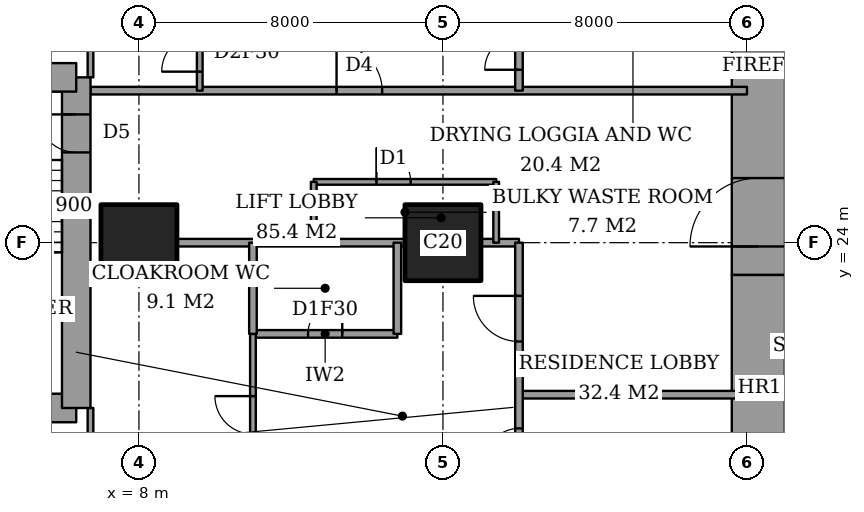
"""IFC4 building model, lengths in metres.
Left out: names, types, materials, properties, quantities, classifications, styles, units other than length and angle.
Written with IfcOpenShell. Run it as: python <this file> out.ifc"""

import sys

from ifc_helpers import new_model, si_unit, direction, frame, frame_2d, origin, origin_2d, place, context, subcontext, project, spatial, rectangle, extrude, element, fill, save


model = new_model("IFC4")
c1 = context("Model", 3, precision=1e-05, world=origin(), true_north=direction((0.0, 1.0)))
c2 = subcontext(c1, "Body", "Model", "MODEL_VIEW")
j1 = project(units=[si_unit("LENGTHUNIT", "METRE"), si_unit("PLANEANGLEUNIT", "RADIAN")], contexts=[c1])
p1 = place(None, origin())
s1 = spatial("IfcSite", under=j1, at=p1, CompositionType="ELEMENT")
p2 = place(p1, origin())
s2 = spatial("IfcBuilding", under=s1, at=p2, CompositionType="ELEMENT")
p3 = place(p2, frame((0.0, 0.0, 69.2)))
s3 = spatial("IfcBuildingStorey", under=s2, at=p3, CompositionType="ELEMENT", Elevation=69.2)
for number, where, z_axis, x_axis in (
    (1, (8.0, 24.0, 0.0), (0.0, 0.0, 1.0), (1.0, 0.0, 0.0)),
    (2, (16.0, 24.0, 0.0), (0.0, 0.0, 1.0), (1.0, 0.0, 0.0)),
):
    element("IfcColumn", number, at=place(p3, frame(where, z_axis=z_axis, x_axis=x_axis)), inside=s3, PredefinedType="COLUMN", context=c2, shape_type="SweptSolid", body=[
        extrude(rectangle(XDim=2.0, YDim=2.0, at=origin_2d()), origin(), (0.0, 0.0, 1.0), 3.6),
    ])
p4 = place(p3, frame((24.3, 13.0, 0.0), z_axis=(0.0, 0.0, 1.0), x_axis=(0.0, 1.0, 0.0)))
e3 = element("IfcWall", 3, at=p4, inside=s3, PredefinedType="SHEAR", context=c2, shape_type="SweptSolid", body=[
    extrude(rectangle(XDim=10.15, YDim=1.4, at=frame_2d((5.075, 0.0))), origin(), (0.0, 0.0, 1.0), 3.6),
])
p5 = place(p3, frame((24.3, 23.15, 0.0), z_axis=(0.0, 0.0, 1.0), x_axis=(0.0, 1.0, 0.0)))
e4 = element("IfcWall", 4, at=p5, inside=s3, PredefinedType="SHEAR", context=c2, shape_type="SweptSolid", body=[
    extrude(rectangle(XDim=11.85, YDim=1.4, at=frame_2d((5.925, 0.0))), origin(), (0.0, 0.0, 1.0), 3.6),
])
p6 = place(p5, frame((0.75, 0.0, 0.0)))
e5 = element("IfcOpeningElement", 5, at=p6, cuts=e4, PredefinedType="OPENING", context=c2, shape_type="SweptSolid", body=[
    extrude(rectangle(XDim=1.8, YDim=2.4, at=frame_2d((0.9, 1.2))), frame((0.0, 0.71, 0.0), z_axis=(0.0, -1.0, 0.0), x_axis=(1.0, 0.0, 0.0)), (0.0, 0.0, 1.0), 1.42),
])
p7 = place(p3, frame((1.9, 19.65, 0.0), z_axis=(0.0, 0.0, 1.0), x_axis=(1.0, 0.0, 0.0)))
e6 = element("IfcWall", 6, at=p7, inside=s3, PredefinedType="SHEAR", context=c2, shape_type="SweptSolid", body=[
    extrude(rectangle(XDim=4.45, YDim=0.75, at=frame_2d((2.225, 0.0))), origin(), (0.0, 0.0, 1.0), 3.6),
])
p8 = place(p3, frame((6.35, 19.65, 0.0), z_axis=(0.0, 0.0, 1.0), x_axis=(0.0, 1.0, 0.0)))
e7 = element("IfcWall", 7, at=p8, inside=s3, PredefinedType="SHEAR", context=c2, shape_type="SweptSolid", body=[
    extrude(rectangle(XDim=8.7, YDim=0.75, at=frame_2d((4.35, 0.0))), origin(), (0.0, 0.0, 1.0), 3.6),
])
p9 = place(p8, frame((6.725, 0.0, 0.0)))
e8 = element("IfcOpeningElement", 8, at=p9, cuts=e7, PredefinedType="OPENING", context=c2, shape_type="SweptSolid", body=[
    extrude(rectangle(XDim=1.0, YDim=2.1, at=frame_2d((0.5, 1.05))), frame((0.0, 0.385, 0.0), z_axis=(0.0, -1.0, 0.0), x_axis=(1.0, 0.0, 0.0)), (0.0, 0.0, 1.0), 0.77),
])
p10 = place(p3, frame((6.35, 28.35, 0.0), z_axis=(0.0, 0.0, 1.0), x_axis=(-1.0, 0.0, 0.0)))
e9 = element("IfcWall", 9, at=p10, inside=s3, PredefinedType="SHEAR", context=c2, shape_type="SweptSolid", body=[
    extrude(rectangle(XDim=4.45, YDim=0.75, at=frame_2d((2.225, 0.0))), origin(), (0.0, 0.0, 1.0), 3.6),
])
p11 = place(p3, frame((18.0, 20.0, 0.0), z_axis=(0.0, 0.0, 1.0), x_axis=(1.0, 0.0, 0.0)))
e10 = element("IfcWall", 10, at=p11, inside=s3, PredefinedType="PARTITIONING", context=c2, shape_type="SweptSolid", body=[
    extrude(rectangle(XDim=6.0, YDim=0.2, at=frame_2d((3.0, 0.0))), origin(), (0.0, 0.0, 1.0), 3.35),
])
p12 = place(p3, frame((11.0, 21.6, 0.0), z_axis=(0.0, 0.0, 1.0), x_axis=(1.0, 0.0, 0.0)))
e11 = element("IfcWall", 11, at=p12, inside=s3, PredefinedType="PARTITIONING", context=c2, shape_type="SweptSolid", body=[
    extrude(rectangle(XDim=3.8, YDim=0.2, at=frame_2d((1.9, 0.0))), origin(), (0.0, 0.0, 1.0), 3.35),
])
p13 = place(p12, frame((1.45, 0.0, 0.0)))
e12 = element("IfcOpeningElement", 12, at=p13, cuts=e11, PredefinedType="OPENING", context=c2, shape_type="SweptSolid", body=[
    extrude(rectangle(XDim=0.9, YDim=2.1, at=frame_2d((0.45, 1.05))), frame((0.0, 0.11, 0.0), z_axis=(0.0, -1.0, 0.0), x_axis=(1.0, 0.0, 0.0)), (0.0, 0.0, 1.0), 0.22),
])
p14 = place(p3, frame((9.0, 24.0, 0.0), z_axis=(0.0, 0.0, 1.0), x_axis=(1.0, 0.0, 0.0)))
e13 = element("IfcWall", 13, at=p14, inside=s3, PredefinedType="PARTITIONING", context=c2, shape_type="SweptSolid", body=[
    extrude(rectangle(XDim=6.0, YDim=0.2, at=frame_2d((3.0, 0.0))), origin(), (0.0, 0.0, 1.0), 3.35),
])
p15 = place(p3, frame((17.0, 24.0, 0.0), z_axis=(0.0, 0.0, 1.0), x_axis=(1.0, 0.0, 0.0)))
e14 = element("IfcWall", 14, at=p15, inside=s3, PredefinedType="PARTITIONING", context=c2, shape_type="SweptSolid", body=[
    extrude(rectangle(XDim=1.0, YDim=0.2, at=frame_2d((0.5, 0.0))), origin(), (0.0, 0.0, 1.0), 3.35),
])
p16 = place(p3, frame((12.6, 25.6, 0.0), z_axis=(0.0, 0.0, 1.0), x_axis=(1.0, 0.0, 0.0)))
e15 = element("IfcWall", 15, at=p16, inside=s3, PredefinedType="PARTITIONING", context=c2, shape_type="SweptSolid", body=[
    extrude(rectangle(XDim=4.8, YDim=0.15, at=frame_2d((2.4, 0.0))), origin(), (0.0, 0.0, 1.0), 3.35),
])
p17 = place(p16, frame((1.65, 0.0, 0.0)))
e16 = element("IfcOpeningElement", 16, at=p17, cuts=e15, PredefinedType="OPENING", context=c2, shape_type="SweptSolid", body=[
    extrude(rectangle(XDim=0.9, YDim=2.1, at=frame_2d((0.45, 1.05))), frame((0.0, 0.085, 0.0), z_axis=(0.0, -1.0, 0.0), x_axis=(1.0, 0.0, 0.0)), (0.0, 0.0, 1.0), 0.17),
])
p18 = place(p3, frame((6.725, 28.0, 0.0), z_axis=(0.0, 0.0, 1.0), x_axis=(1.0, 0.0, 0.0)))
e17 = element("IfcWall", 17, at=p18, inside=s3, PredefinedType="PARTITIONING", context=c2, shape_type="SweptSolid", body=[
    extrude(rectangle(XDim=17.275, YDim=0.2, at=frame_2d((8.637, 0.0))), origin(), (0.0, 0.0, 1.0), 3.35),
])
p19 = place(p18, frame((6.475, 0.0, 0.0)))
e18 = element("IfcOpeningElement", 18, at=p19, cuts=e17, PredefinedType="OPENING", context=c2, shape_type="SweptSolid", body=[
    extrude(rectangle(XDim=1.2, YDim=2.4, at=frame_2d((0.6, 1.2))), frame((0.0, 0.11, 0.0), z_axis=(0.0, -1.0, 0.0), x_axis=(1.0, 0.0, 0.0)), (0.0, 0.0, 1.0), 0.22),
])
p20 = place(p3, frame((6.725, 17.2, 0.0), z_axis=(0.0, 0.0, 1.0), x_axis=(0.0, 1.0, 0.0)))
e19 = element("IfcWall", 19, at=p20, inside=s3, PredefinedType="PARTITIONING", context=c2, shape_type="SweptSolid", body=[
    extrude(rectangle(XDim=2.45, YDim=0.15, at=frame_2d((1.225, 0.0))), origin(), (0.0, 0.0, 1.0), 3.35),
])
p21 = place(p20, frame((0.587, 0.0, 0.0)))
e20 = element("IfcOpeningElement", 20, at=p21, cuts=e19, PredefinedType="OPENING", context=c2, shape_type="SweptSolid", body=[
    extrude(rectangle(XDim=0.9, YDim=2.1, at=frame_2d((0.45, 1.05))), frame((0.0, 0.085, 0.0), z_axis=(0.0, -1.0, 0.0), x_axis=(1.0, 0.0, 0.0)), (0.0, 0.0, 1.0), 0.17),
])
p22 = place(p3, frame((6.725, 28.35, 0.0), z_axis=(0.0, 0.0, 1.0), x_axis=(0.0, 1.0, 0.0)))
e21 = element("IfcWall", 21, at=p22, inside=s3, PredefinedType="PARTITIONING", context=c2, shape_type="SweptSolid", body=[
    extrude(rectangle(XDim=2.45, YDim=0.15, at=frame_2d((1.225, 0.0))), origin(), (0.0, 0.0, 1.0), 3.35),
])
p23 = place(p22, frame((0.913, 0.0, 0.0)))
e22 = element("IfcOpeningElement", 22, at=p23, cuts=e21, PredefinedType="OPENING", context=c2, shape_type="SweptSolid", body=[
    extrude(rectangle(XDim=1.0, YDim=2.1, at=frame_2d((0.5, 1.05))), frame((0.0, 0.085, 0.0), z_axis=(0.0, -1.0, 0.0), x_axis=(1.0, 0.0, 0.0)), (0.0, 0.0, 1.0), 0.17),
])
p24 = place(p3, frame((9.6, 28.0, 0.0), z_axis=(0.0, 0.0, 1.0), x_axis=(0.0, 1.0, 0.0)))
e23 = element("IfcWall", 23, at=p24, inside=s3, PredefinedType="PARTITIONING", context=c2, shape_type="SweptSolid", body=[
    extrude(rectangle(XDim=9.4, YDim=0.15, at=frame_2d((4.7, 0.0))), origin(), (0.0, 0.0, 1.0), 3.35),
])
p25 = place(p24, frame((0.5, 0.0, 0.0)))
e24 = element("IfcOpeningElement", 24, at=p25, cuts=e23, PredefinedType="OPENING", context=c2, shape_type="SweptSolid", body=[
    extrude(rectangle(XDim=1.0, YDim=2.1, at=frame_2d((0.5, 1.05))), frame((0.0, 0.085, 0.0), z_axis=(0.0, -1.0, 0.0), x_axis=(1.0, 0.0, 0.0)), (0.0, 0.0, 1.0), 0.17),
])
p26 = place(p3, frame((11.0, 21.6, 0.0), z_axis=(0.0, 0.0, 1.0), x_axis=(0.0, 1.0, 0.0)))
e25 = element("IfcWall", 25, at=p26, inside=s3, PredefinedType="PARTITIONING", context=c2, shape_type="SweptSolid", body=[
    extrude(rectangle(XDim=2.4, YDim=0.2, at=frame_2d((1.2, 0.0))), origin(), (0.0, 0.0, 1.0), 3.35),
])
p27 = place(p3, frame((11.0, 11.0, 0.0), z_axis=(0.0, 0.0, 1.0), x_axis=(0.0, 1.0, 0.0)))
e26 = element("IfcWall", 26, at=p27, inside=s3, PredefinedType="PARTITIONING", context=c2, shape_type="SweptSolid", body=[
    extrude(rectangle(XDim=10.6, YDim=0.15, at=frame_2d((5.3, 0.0))), origin(), (0.0, 0.0, 1.0), 3.35),
])
p28 = place(p27, frame((7.962, 0.0, 0.0)))
e27 = element("IfcOpeningElement", 27, at=p28, cuts=e26, PredefinedType="OPENING", context=c2, shape_type="SweptSolid", body=[
    extrude(rectangle(XDim=1.0, YDim=2.1, at=frame_2d((0.5, 1.05))), frame((0.0, 0.085, 0.0), z_axis=(0.0, -1.0, 0.0), x_axis=(1.0, 0.0, 0.0)), (0.0, 0.0, 1.0), 0.17),
])
p29 = place(p3, frame((12.6, 24.0, 0.0), z_axis=(0.0, 0.0, 1.0), x_axis=(0.0, 1.0, 0.0)))
e28 = element("IfcWall", 28, at=p29, inside=s3, PredefinedType="PARTITIONING", context=c2, shape_type="SweptSolid", body=[
    extrude(rectangle(XDim=1.6, YDim=0.15, at=frame_2d((0.8, 0.0))), origin(), (0.0, 0.0, 1.0), 3.35),
])
p30 = place(p3, frame((14.8, 21.6, 0.0), z_axis=(0.0, 0.0, 1.0), x_axis=(0.0, 1.0, 0.0)))
e29 = element("IfcWall", 29, at=p30, inside=s3, PredefinedType="PARTITIONING", context=c2, shape_type="SweptSolid", body=[
    extrude(rectangle(XDim=2.4, YDim=0.2, at=frame_2d((1.2, 0.0))), origin(), (0.0, 0.0, 1.0), 3.35),
])
p31 = place(p3, frame((17.4, 24.0, 0.0), z_axis=(0.0, 0.0, 1.0), x_axis=(0.0, 1.0, 0.0)))
e30 = element("IfcWall", 30, at=p31, inside=s3, PredefinedType="PARTITIONING", context=c2, shape_type="SweptSolid", body=[
    extrude(rectangle(XDim=1.6, YDim=0.15, at=frame_2d((0.8, 0.0))), origin(), (0.0, 0.0, 1.0), 3.35),
])
p32 = place(p3, frame((18.0, 17.325, 0.0), z_axis=(0.0, 0.0, 1.0), x_axis=(0.0, 1.0, 0.0)))
e31 = element("IfcWall", 31, at=p32, inside=s3, PredefinedType="PARTITIONING", context=c2, shape_type="SweptSolid", body=[
    extrude(rectangle(XDim=6.675, YDim=0.2, at=frame_2d((3.337, 0.0))), origin(), (0.0, 0.0, 1.0), 3.35),
])
p33 = place(p32, frame((4.075, 0.0, 0.0)))
e32 = element("IfcOpeningElement", 32, at=p33, cuts=e31, PredefinedType="OPENING", context=c2, shape_type="SweptSolid", body=[
    extrude(rectangle(XDim=1.2, YDim=2.4, at=frame_2d((0.6, 1.2))), frame((0.0, 0.11, 0.0), z_axis=(0.0, -1.0, 0.0), x_axis=(1.0, 0.0, 0.0)), (0.0, 0.0, 1.0), 0.22),
])
p34 = place(p32, frame((0.887, 0.0, 0.0)))
e33 = element("IfcOpeningElement", 33, at=p34, cuts=e31, PredefinedType="OPENING", context=c2, shape_type="SweptSolid", body=[
    extrude(rectangle(XDim=0.9, YDim=2.1, at=frame_2d((0.45, 1.05))), frame((0.0, 0.11, 0.0), z_axis=(0.0, -1.0, 0.0), x_axis=(1.0, 0.0, 0.0)), (0.0, 0.0, 1.0), 0.22),
])
p35 = place(p3, frame((18.0, 28.0, 0.0), z_axis=(0.0, 0.0, 1.0), x_axis=(0.0, 1.0, 0.0)))
e34 = element("IfcWall", 34, at=p35, inside=s3, PredefinedType="PARTITIONING", context=c2, shape_type="SweptSolid", body=[
    extrude(rectangle(XDim=3.4, YDim=0.2, at=frame_2d((1.7, 0.0))), origin(), (0.0, 0.0, 1.0), 3.35),
])
p36 = place(p35, frame((0.55, 0.0, 0.0)))
e35 = element("IfcOpeningElement", 35, at=p36, cuts=e34, PredefinedType="OPENING", context=c2, shape_type="SweptSolid", body=[
    extrude(rectangle(XDim=0.9, YDim=2.1, at=frame_2d((0.45, 1.05))), frame((0.0, 0.11, 0.0), z_axis=(0.0, -1.0, 0.0), x_axis=(1.0, 0.0, 0.0)), (0.0, 0.0, 1.0), 0.22),
])
p37 = place(p28, origin())
e36 = element("IfcDoor", 36, at=p37, inside=s3, OperationType="SINGLE_SWING_LEFT", PredefinedType="DOOR", context=c2, shape_type="SweptSolid", body=[
    extrude(rectangle(XDim=1.0, YDim=2.1, at=frame_2d((0.5, 1.05))), frame((0.0, 0.025, 0.0), z_axis=(0.0, -1.0, 0.0), x_axis=(1.0, 0.0, 0.0)), (0.0, 0.0, 1.0), 0.05),
])
fill(e27, e36)
p38 = place(p13, origin())
e37 = element("IfcDoor", 37, at=p38, inside=s3, OperationType="SINGLE_SWING_LEFT", PredefinedType="DOOR", context=c2, shape_type="SweptSolid", body=[
    extrude(rectangle(XDim=0.9, YDim=2.1, at=frame_2d((0.45, 1.05))), frame((0.0, 0.025, 0.0), z_axis=(0.0, -1.0, 0.0), x_axis=(1.0, 0.0, 0.0)), (0.0, 0.0, 1.0), 0.05),
])
fill(e12, e37)
p39 = place(p33, origin())
e38 = element("IfcDoor", 38, at=p39, inside=s3, OperationType="SINGLE_SWING_LEFT", PredefinedType="DOOR", context=c2, shape_type="SweptSolid", body=[
    extrude(rectangle(XDim=1.2, YDim=2.4, at=frame_2d((0.6, 1.2))), frame((0.0, 0.025, 0.0), z_axis=(0.0, -1.0, 0.0), x_axis=(1.0, 0.0, 0.0)), (0.0, 0.0, 1.0), 0.05),
])
fill(e32, e38)
p40 = place(p34, origin())
e39 = element("IfcDoor", 39, at=p40, inside=s3, OperationType="SINGLE_SWING_RIGHT", PredefinedType="DOOR", context=c2, shape_type="SweptSolid", body=[
    extrude(rectangle(XDim=0.9, YDim=2.1, at=frame_2d((0.45, 1.05))), frame((0.0, 0.025, 0.0), z_axis=(0.0, -1.0, 0.0), x_axis=(1.0, 0.0, 0.0)), (0.0, 0.0, 1.0), 0.05),
])
fill(e33, e39)
p41 = place(p25, origin())
e40 = element("IfcDoor", 40, at=p41, inside=s3, OperationType="SINGLE_SWING_RIGHT", PredefinedType="DOOR", context=c2, shape_type="SweptSolid", body=[
    extrude(rectangle(XDim=1.0, YDim=2.1, at=frame_2d((0.5, 1.05))), frame((0.0, 0.025, 0.0), z_axis=(0.0, -1.0, 0.0), x_axis=(1.0, 0.0, 0.0)), (0.0, 0.0, 1.0), 0.05),
])
fill(e24, e40)
p42 = place(p19, origin())
e41 = element("IfcDoor", 41, at=p42, inside=s3, OperationType="SINGLE_SWING_RIGHT", PredefinedType="DOOR", context=c2, shape_type="SweptSolid", body=[
    extrude(rectangle(XDim=1.2, YDim=2.4, at=frame_2d((0.6, 1.2))), frame((0.0, 0.025, 0.0), z_axis=(0.0, -1.0, 0.0), x_axis=(1.0, 0.0, 0.0)), (0.0, 0.0, 1.0), 0.05),
])
fill(e18, e41)
p43 = place(p36, origin())
e42 = element("IfcDoor", 42, at=p43, inside=s3, OperationType="SINGLE_SWING_RIGHT", PredefinedType="DOOR", context=c2, shape_type="SweptSolid", body=[
    extrude(rectangle(XDim=0.9, YDim=2.1, at=frame_2d((0.45, 1.05))), frame((0.0, 0.025, 0.0), z_axis=(0.0, -1.0, 0.0), x_axis=(1.0, 0.0, 0.0)), (0.0, 0.0, 1.0), 0.05),
])
fill(e35, e42)
p44 = place(p17, origin())
e43 = element("IfcDoor", 43, at=p44, inside=s3, OperationType="SINGLE_SWING_RIGHT", PredefinedType="DOOR", context=c2, shape_type="SweptSolid", body=[
    extrude(rectangle(XDim=0.9, YDim=2.1, at=frame_2d((0.45, 1.05))), frame((0.0, 0.025, 0.0), z_axis=(0.0, -1.0, 0.0), x_axis=(1.0, 0.0, 0.0)), (0.0, 0.0, 1.0), 0.05),
])
fill(e16, e43)
p45 = place(p6, origin())
e44 = element("IfcDoor", 44, at=p45, inside=s3, OperationType="DOUBLE_DOOR_DOUBLE_SWING", PredefinedType="DOOR", context=c2, shape_type="SweptSolid", body=[
    extrude(rectangle(XDim=1.8, YDim=2.4, at=frame_2d((0.9, 1.2))), frame((0.0, 0.025, 0.0), z_axis=(0.0, -1.0, 0.0), x_axis=(1.0, 0.0, 0.0)), (0.0, 0.0, 1.0), 0.05),
])
fill(e5, e44)
p46 = place(p9, origin())
e45 = element("IfcDoor", 45, at=p46, inside=s3, OperationType="SINGLE_SWING_LEFT", PredefinedType="DOOR", context=c2, shape_type="SweptSolid", body=[
    extrude(rectangle(XDim=1.0, YDim=2.1, at=frame_2d((0.5, 1.05))), frame((0.0, 0.025, 0.0), z_axis=(0.0, -1.0, 0.0), x_axis=(1.0, 0.0, 0.0)), (0.0, 0.0, 1.0), 0.05),
])
fill(e8, e45)
save(model, sys.argv[1])
